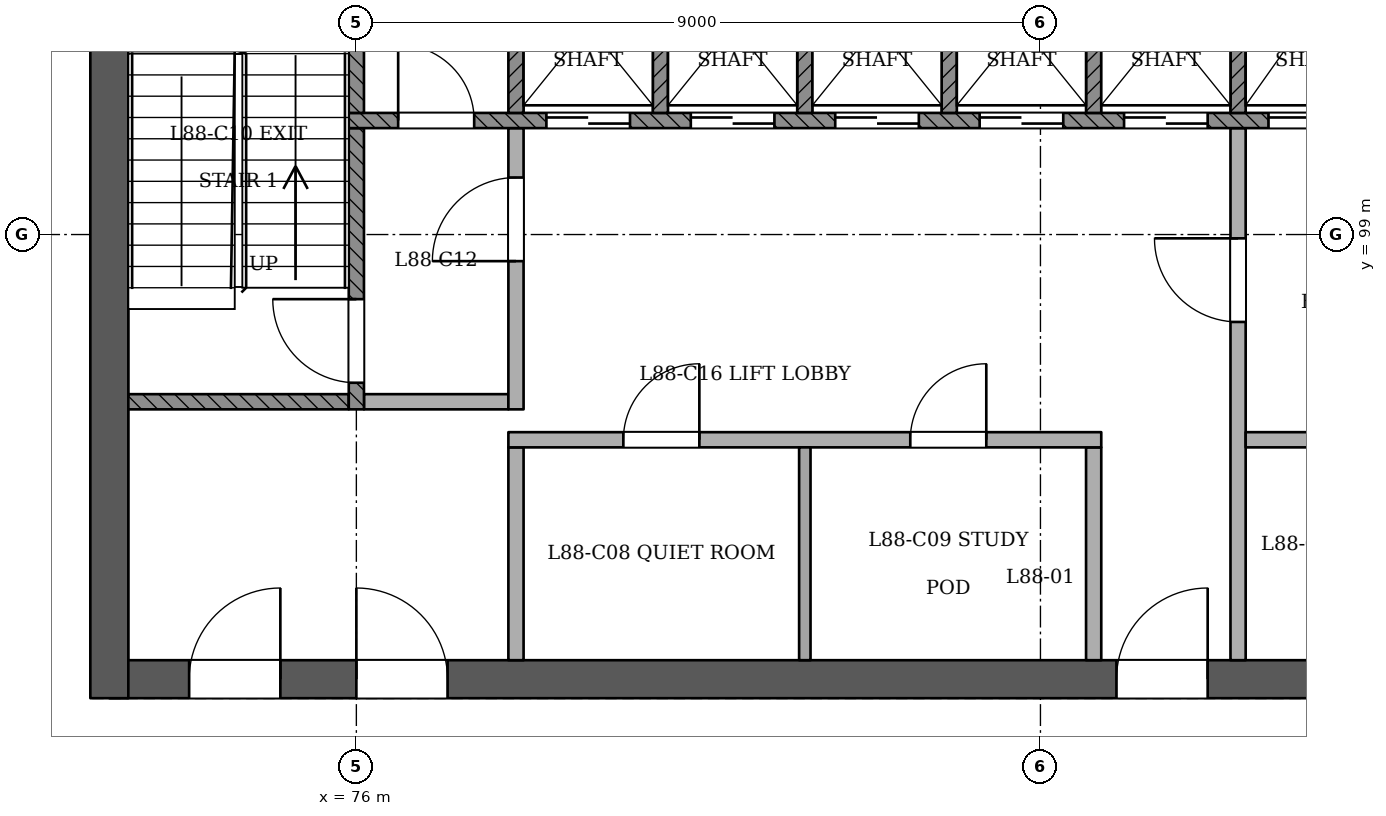
"""IFC4 building model, lengths in metres.
Left out: names, types, materials, properties, quantities, classifications, styles, units other than length and angle.
Written with IfcOpenShell. Run it as: python <this file> out.ifc"""

import sys

from ifc_helpers import new_model, si_unit, direction, frame, frame_2d, origin, place, context, subcontext, project, spatial, rectangle, extrude, element, fill, save


model = new_model("IFC4")
c1 = context("Model", 3, precision=1e-05, world=origin(), true_north=direction((0.0, 1.0)))
c2 = subcontext(c1, "Body", "Model", "MODEL_VIEW")
j1 = project(units=[si_unit("LENGTHUNIT", "METRE"), si_unit("PLANEANGLEUNIT", "RADIAN")], contexts=[c1])
p1 = place(None, origin())
s1 = spatial("IfcSite", under=j1, at=p1, CompositionType="ELEMENT")
p2 = place(p1, origin())
s2 = spatial("IfcBuilding", under=s1, at=p2, CompositionType="ELEMENT")
p3 = place(p2, frame((0.0, 0.0, 338.8)))
s3 = spatial("IfcBuildingStorey", under=s2, at=p3, CompositionType="ELEMENT", Elevation=338.8)
p4 = place(p3, frame((72.75, 93.15, 0.0), z_axis=(0.0, 0.0, 1.0), x_axis=(1.0, 0.0, 0.0)))
e1 = element("IfcWall", 1, at=p4, inside=s3, PredefinedType="SHEAR", context=c2, shape_type="SweptSolid", body=[
    extrude(rectangle(XDim=24.75, YDim=0.5, at=frame_2d((12.375, 0.0))), origin(), (0.0, 0.0, 1.0), 4.2),
])
p5 = place(p4, frame((1.05, 0.0, 0.0)))
e2 = element("IfcOpeningElement", 2, at=p5, cuts=e1, PredefinedType="OPENING", context=c2, shape_type="SweptSolid", body=[
    extrude(rectangle(XDim=1.2, YDim=2.1, at=frame_2d((0.6, 1.05))), frame((0.0, 0.26, 0.0), z_axis=(0.0, -1.0, 0.0), x_axis=(1.0, 0.0, 0.0)), (0.0, 0.0, 1.0), 0.521),
])
p6 = place(p4, frame((3.25, 0.0, 0.0)))
e3 = element("IfcOpeningElement", 3, at=p6, cuts=e1, PredefinedType="OPENING", context=c2, shape_type="SweptSolid", body=[
    extrude(rectangle(XDim=1.2, YDim=2.1, at=frame_2d((0.6, 1.05))), frame((0.0, 0.26, 0.0), z_axis=(0.0, -1.0, 0.0), x_axis=(1.0, 0.0, 0.0)), (0.0, 0.0, 1.0), 0.521),
])
p7 = place(p4, frame((13.25, 0.0, 0.0)))
e4 = element("IfcOpeningElement", 4, at=p7, cuts=e1, PredefinedType="OPENING", context=c2, shape_type="SweptSolid", body=[
    extrude(rectangle(XDim=1.2, YDim=2.1, at=frame_2d((0.6, 1.05))), frame((0.0, 0.26, 0.0), z_axis=(0.0, -1.0, 0.0), x_axis=(1.0, 0.0, 0.0)), (0.0, 0.0, 1.0), 0.521),
])
p8 = place(p4, frame((16.113, 0.0, 0.0)))
e5 = element("IfcOpeningElement", 5, at=p8, cuts=e1, PredefinedType="OPENING", context=c2, shape_type="SweptSolid", body=[
    extrude(rectangle(XDim=1.0, YDim=2.1, at=frame_2d((0.5, 1.05))), frame((0.0, 0.26, 0.0), z_axis=(0.0, -1.0, 0.0), x_axis=(1.0, 0.0, 0.0)), (0.0, 0.0, 1.0), 0.521),
])
p9 = place(p4, frame((19.55, 0.0, 0.0)))
e6 = element("IfcOpeningElement", 6, at=p9, cuts=e1, PredefinedType="OPENING", context=c2, shape_type="SweptSolid", body=[
    extrude(rectangle(XDim=1.0, YDim=2.1, at=frame_2d((0.5, 1.05))), frame((0.0, 0.26, 0.0), z_axis=(0.0, -1.0, 0.0), x_axis=(1.0, 0.0, 0.0)), (0.0, 0.0, 1.0), 0.521),
])
p10 = place(p4, frame((22.538, 0.0, 0.0)))
e7 = element("IfcOpeningElement", 7, at=p10, cuts=e1, PredefinedType="OPENING", context=c2, shape_type="SweptSolid", body=[
    extrude(rectangle(XDim=1.0, YDim=2.1, at=frame_2d((0.5, 1.05))), frame((0.0, 0.26, 0.0), z_axis=(0.0, -1.0, 0.0), x_axis=(1.0, 0.0, 0.0)), (0.0, 0.0, 1.0), 0.521),
])
p11 = place(p3, frame((72.75, 103.65, 0.0), z_axis=(0.0, 0.0, 1.0), x_axis=(0.0, -1.0, 0.0)))
e8 = element("IfcWall", 8, at=p11, inside=s3, PredefinedType="SHEAR", context=c2, shape_type="SweptSolid", body=[
    extrude(rectangle(XDim=10.75, YDim=0.5, at=frame_2d((5.375, 0.0))), origin(), (0.0, 0.0, 1.0), 4.2),
])
p12 = place(p3, frame((78.1, 93.4, 0.0), z_axis=(0.0, 0.0, 1.0), x_axis=(0.0, 1.0, 0.0)))
e9 = element("IfcWall", 9, at=p12, inside=s3, PredefinedType="PARTITIONING", context=c2, shape_type="SweptSolid", body=[
    extrude(rectangle(XDim=2.8, YDim=0.2, at=frame_2d((1.4, 0.0))), origin(), (0.0, 0.0, 1.0), 3.9),
])
p13 = place(p3, frame((81.9, 93.4, 0.0), z_axis=(0.0, 0.0, 1.0), x_axis=(0.0, 1.0, 0.0)))
e10 = element("IfcWall", 10, at=p13, inside=s3, PredefinedType="PARTITIONING", context=c2, shape_type="SweptSolid", body=[
    extrude(rectangle(XDim=2.8, YDim=0.15, at=frame_2d((1.4, 0.0))), origin(), (0.0, 0.0, 1.0), 3.9),
])
p14 = place(p3, frame((85.7, 93.4, 0.0), z_axis=(0.0, 0.0, 1.0), x_axis=(0.0, 1.0, 0.0)))
e11 = element("IfcWall", 11, at=p14, inside=s3, PredefinedType="PARTITIONING", context=c2, shape_type="SweptSolid", body=[
    extrude(rectangle(XDim=2.8, YDim=0.2, at=frame_2d((1.4, 0.0))), origin(), (0.0, 0.0, 1.0), 3.9),
])
p15 = place(p3, frame((87.6, 93.4, 0.0), z_axis=(0.0, 0.0, 1.0), x_axis=(0.0, 1.0, 0.0)))
e12 = element("IfcWall", 12, at=p15, inside=s3, PredefinedType="PARTITIONING", context=c2, shape_type="SweptSolid", body=[
    extrude(rectangle(XDim=7.0, YDim=0.2, at=frame_2d((3.5, 0.0))), origin(), (0.0, 0.0, 1.0), 3.9),
])
p16 = place(p15, frame((4.45, 0.0, 0.0)))
e13 = element("IfcOpeningElement", 13, at=p16, cuts=e12, PredefinedType="OPENING", context=c2, shape_type="SweptSolid", body=[
    extrude(rectangle(XDim=1.1, YDim=2.1, at=frame_2d((0.55, 1.05))), frame((0.0, 0.11, 0.0), z_axis=(0.0, -1.0, 0.0), x_axis=(1.0, 0.0, 0.0)), (0.0, 0.0, 1.0), 0.221),
])
p17 = place(p3, frame((78.0, 96.3, 0.0), z_axis=(0.0, 0.0, 1.0), x_axis=(1.0, 0.0, 0.0)))
e14 = element("IfcWall", 14, at=p17, inside=s3, PredefinedType="PARTITIONING", context=c2, shape_type="SweptSolid", body=[
    extrude(rectangle(XDim=7.8, YDim=0.2, at=frame_2d((3.9, 0.0))), origin(), (0.0, 0.0, 1.0), 3.9),
])
p18 = place(p17, frame((1.512, 0.0, 0.0)))
e15 = element("IfcOpeningElement", 15, at=p18, cuts=e14, PredefinedType="OPENING", context=c2, shape_type="SweptSolid", body=[
    extrude(rectangle(XDim=1.0, YDim=2.1, at=frame_2d((0.5, 1.05))), frame((0.0, 0.11, 0.0), z_axis=(0.0, -1.0, 0.0), x_axis=(1.0, 0.0, 0.0)), (0.0, 0.0, 1.0), 0.221),
])
p19 = place(p17, frame((5.288, 0.0, 0.0)))
e16 = element("IfcOpeningElement", 16, at=p19, cuts=e14, PredefinedType="OPENING", context=c2, shape_type="SweptSolid", body=[
    extrude(rectangle(XDim=1.0, YDim=2.1, at=frame_2d((0.5, 1.05))), frame((0.0, 0.11, 0.0), z_axis=(0.0, -1.0, 0.0), x_axis=(1.0, 0.0, 0.0)), (0.0, 0.0, 1.0), 0.221),
])
p20 = place(p3, frame((87.7, 96.3, 0.0), z_axis=(0.0, 0.0, 1.0), x_axis=(1.0, 0.0, 0.0)))
e17 = element("IfcWall", 17, at=p20, inside=s3, PredefinedType="PARTITIONING", context=c2, shape_type="SweptSolid", body=[
    extrude(rectangle(XDim=3.6, YDim=0.2, at=frame_2d((1.8, 0.0))), origin(), (0.0, 0.0, 1.0), 3.9),
])
p21 = place(p3, frame((73.0, 96.8, 0.0), z_axis=(0.0, 0.0, 1.0), x_axis=(1.0, 0.0, 0.0)))
e18 = element("IfcWall", 18, at=p21, inside=s3, PredefinedType="SOLIDWALL", context=c2, shape_type="SweptSolid", body=[
    extrude(rectangle(XDim=2.9, YDim=0.2, at=frame_2d((1.45, 0.0))), origin(), (0.0, 0.0, 1.0), 3.9),
])
p22 = place(p3, frame((76.0, 96.7, 0.0), z_axis=(0.0, 0.0, 1.0), x_axis=(0.0, 1.0, 0.0)))
e19 = element("IfcWall", 19, at=p22, inside=s3, PredefinedType="SOLIDWALL", context=c2, shape_type="SweptSolid", body=[
    extrude(rectangle(XDim=3.7, YDim=0.2, at=frame_2d((1.85, 0.0))), origin(), (0.0, 0.0, 1.0), 3.9),
])
p23 = place(p22, frame((0.35, 0.0, 0.0)))
e20 = element("IfcOpeningElement", 20, at=p23, cuts=e19, PredefinedType="OPENING", context=c2, shape_type="SweptSolid", body=[
    extrude(rectangle(XDim=1.1, YDim=2.1, at=frame_2d((0.55, 1.05))), frame((0.0, 0.11, 0.0), z_axis=(0.0, -1.0, 0.0), x_axis=(1.0, 0.0, 0.0)), (0.0, 0.0, 1.0), 0.221),
])
p24 = place(p3, frame((76.1, 96.8, 0.0), z_axis=(0.0, 0.0, 1.0), x_axis=(1.0, 0.0, 0.0)))
e21 = element("IfcWall", 21, at=p24, inside=s3, PredefinedType="PARTITIONING", context=c2, shape_type="SweptSolid", body=[
    extrude(rectangle(XDim=1.9, YDim=0.2, at=frame_2d((0.95, 0.0))), origin(), (0.0, 0.0, 1.0), 3.9),
])
p25 = place(p3, frame((78.1, 96.7, 0.0), z_axis=(0.0, 0.0, 1.0), x_axis=(0.0, 1.0, 0.0)))
e22 = element("IfcWall", 22, at=p25, inside=s3, PredefinedType="PARTITIONING", context=c2, shape_type="SweptSolid", body=[
    extrude(rectangle(XDim=3.7, YDim=0.2, at=frame_2d((1.85, 0.0))), origin(), (0.0, 0.0, 1.0), 3.9),
])
p26 = place(p25, frame((1.95, 0.0, 0.0)))
e23 = element("IfcOpeningElement", 23, at=p26, cuts=e22, PredefinedType="OPENING", context=c2, shape_type="SweptSolid", body=[
    extrude(rectangle(XDim=1.1, YDim=2.1, at=frame_2d((0.55, 1.05))), frame((0.0, 0.11, 0.0), z_axis=(0.0, -1.0, 0.0), x_axis=(1.0, 0.0, 0.0)), (0.0, 0.0, 1.0), 0.221),
])
p27 = place(p3, frame((75.9, 100.5, 0.0), z_axis=(0.0, 0.0, 1.0), x_axis=(1.0, 0.0, 0.0)))
e24 = element("IfcWall", 24, at=p27, inside=s3, PredefinedType="SOLIDWALL", context=c2, shape_type="SweptSolid", body=[
    extrude(rectangle(XDim=18.2, YDim=0.2, at=frame_2d((9.1, 0.0))), origin(), (0.0, 0.0, 1.0), 3.9),
])
p28 = place(p27, frame((2.6, 0.0, 0.0)))
e25 = element("IfcOpeningElement", 25, at=p28, cuts=e24, PredefinedType="OPENING", context=c2, shape_type="SweptSolid", body=[
    extrude(rectangle(XDim=1.1, YDim=2.1, at=frame_2d((0.55, 1.05))), frame((0.0, 0.11, 0.0), z_axis=(0.0, -1.0, 0.0), x_axis=(1.0, 0.0, 0.0)), (0.0, 0.0, 1.0), 0.221),
])
p29 = place(p27, frame((4.5, 0.0, 0.0)))
e26 = element("IfcOpeningElement", 26, at=p29, cuts=e24, PredefinedType="OPENING", context=c2, shape_type="SweptSolid", body=[
    extrude(rectangle(XDim=1.1, YDim=2.1, at=frame_2d((0.55, 1.05))), frame((0.0, 0.11, 0.0), z_axis=(0.0, -1.0, 0.0), x_axis=(1.0, 0.0, 0.0)), (0.0, 0.0, 1.0), 0.221),
])
p30 = place(p27, frame((6.4, 0.0, 0.0)))
e27 = element("IfcOpeningElement", 27, at=p30, cuts=e24, PredefinedType="OPENING", context=c2, shape_type="SweptSolid", body=[
    extrude(rectangle(XDim=1.1, YDim=2.1, at=frame_2d((0.55, 1.05))), frame((0.0, 0.11, 0.0), z_axis=(0.0, -1.0, 0.0), x_axis=(1.0, 0.0, 0.0)), (0.0, 0.0, 1.0), 0.221),
])
p31 = place(p27, frame((8.3, 0.0, 0.0)))
e28 = element("IfcOpeningElement", 28, at=p31, cuts=e24, PredefinedType="OPENING", context=c2, shape_type="SweptSolid", body=[
    extrude(rectangle(XDim=1.1, YDim=2.1, at=frame_2d((0.55, 1.05))), frame((0.0, 0.11, 0.0), z_axis=(0.0, -1.0, 0.0), x_axis=(1.0, 0.0, 0.0)), (0.0, 0.0, 1.0), 0.221),
])
p32 = place(p27, frame((10.2, 0.0, 0.0)))
e29 = element("IfcOpeningElement", 29, at=p32, cuts=e24, PredefinedType="OPENING", context=c2, shape_type="SweptSolid", body=[
    extrude(rectangle(XDim=1.1, YDim=2.1, at=frame_2d((0.55, 1.05))), frame((0.0, 0.11, 0.0), z_axis=(0.0, -1.0, 0.0), x_axis=(1.0, 0.0, 0.0)), (0.0, 0.0, 1.0), 0.221),
])
p33 = place(p27, frame((12.1, 0.0, 0.0)))
e30 = element("IfcOpeningElement", 30, at=p33, cuts=e24, PredefinedType="OPENING", context=c2, shape_type="SweptSolid", body=[
    extrude(rectangle(XDim=1.1, YDim=2.1, at=frame_2d((0.55, 1.05))), frame((0.0, 0.11, 0.0), z_axis=(0.0, -1.0, 0.0), x_axis=(1.0, 0.0, 0.0)), (0.0, 0.0, 1.0), 0.221),
])
p34 = place(p27, frame((14.0, 0.0, 0.0)))
e31 = element("IfcOpeningElement", 31, at=p34, cuts=e24, PredefinedType="OPENING", context=c2, shape_type="SweptSolid", body=[
    extrude(rectangle(XDim=1.1, YDim=2.1, at=frame_2d((0.55, 1.05))), frame((0.0, 0.11, 0.0), z_axis=(0.0, -1.0, 0.0), x_axis=(1.0, 0.0, 0.0)), (0.0, 0.0, 1.0), 0.221),
])
p35 = place(p27, frame((0.65, 0.0, 0.0)))
e32 = element("IfcOpeningElement", 32, at=p35, cuts=e24, PredefinedType="OPENING", context=c2, shape_type="SweptSolid", body=[
    extrude(rectangle(XDim=1.0, YDim=2.1, at=frame_2d((0.5, 1.05))), frame((0.0, 0.11, 0.0), z_axis=(0.0, -1.0, 0.0), x_axis=(1.0, 0.0, 0.0)), (0.0, 0.0, 1.0), 0.221),
])
p36 = place(p27, frame((16.3, 0.0, 0.0)))
e33 = element("IfcOpeningElement", 33, at=p36, cuts=e24, PredefinedType="OPENING", context=c2, shape_type="SweptSolid", body=[
    extrude(rectangle(XDim=1.0, YDim=2.1, at=frame_2d((0.5, 1.05))), frame((0.0, 0.11, 0.0), z_axis=(0.0, -1.0, 0.0), x_axis=(1.0, 0.0, 0.0)), (0.0, 0.0, 1.0), 0.221),
])
for number, where, z_axis, x_axis in (
    (34, (76.0, 100.6, 0.0), (0.0, 0.0, 1.0), (0.0, 1.0, 0.0)),
    (35, (78.1, 100.6, 0.0), (0.0, 0.0, 1.0), (0.0, 1.0, 0.0)),
    (36, (80.0, 100.6, 0.0), (0.0, 0.0, 1.0), (0.0, 1.0, 0.0)),
    (37, (81.9, 100.6, 0.0), (0.0, 0.0, 1.0), (0.0, 1.0, 0.0)),
    (38, (83.8, 100.6, 0.0), (0.0, 0.0, 1.0), (0.0, 1.0, 0.0)),
    (39, (85.7, 100.6, 0.0), (0.0, 0.0, 1.0), (0.0, 1.0, 0.0)),
    (40, (87.6, 100.6, 0.0), (0.0, 0.0, 1.0), (0.0, 1.0, 0.0)),
):
    element("IfcWall", number, at=place(p3, frame(where, z_axis=z_axis, x_axis=x_axis)), inside=s3, PredefinedType="SOLIDWALL", context=c2, shape_type="SweptSolid", body=[
        extrude(rectangle(XDim=2.8, YDim=0.2, at=frame_2d((1.4, 0.0))), origin(), (0.0, 0.0, 1.0), 3.9),
    ])
p37 = place(p28, origin())
e41 = element("IfcDoor", 41, at=p37, inside=s3, OperationType="SLIDING_TO_RIGHT", PredefinedType="NOTDEFINED", context=c2, shape_type="SweptSolid", body=[
    extrude(rectangle(XDim=1.1, YDim=2.1, at=frame_2d((0.55, 1.05))), frame((0.0, 0.025, 0.0), z_axis=(0.0, -1.0, 0.0), x_axis=(1.0, 0.0, 0.0)), (0.0, 0.0, 1.0), 0.05),
])
fill(e25, e41)
p38 = place(p29, origin())
e42 = element("IfcDoor", 42, at=p38, inside=s3, OperationType="SLIDING_TO_LEFT", PredefinedType="NOTDEFINED", context=c2, shape_type="SweptSolid", body=[
    extrude(rectangle(XDim=1.1, YDim=2.1, at=frame_2d((0.55, 1.05))), frame((0.0, 0.025, 0.0), z_axis=(0.0, -1.0, 0.0), x_axis=(1.0, 0.0, 0.0)), (0.0, 0.0, 1.0), 0.05),
])
fill(e26, e42)
p39 = place(p30, origin())
e43 = element("IfcDoor", 43, at=p39, inside=s3, OperationType="SLIDING_TO_RIGHT", PredefinedType="NOTDEFINED", context=c2, shape_type="SweptSolid", body=[
    extrude(rectangle(XDim=1.1, YDim=2.1, at=frame_2d((0.55, 1.05))), frame((0.0, 0.025, 0.0), z_axis=(0.0, -1.0, 0.0), x_axis=(1.0, 0.0, 0.0)), (0.0, 0.0, 1.0), 0.05),
])
fill(e27, e43)
p40 = place(p31, origin())
e44 = element("IfcDoor", 44, at=p40, inside=s3, OperationType="SLIDING_TO_LEFT", PredefinedType="NOTDEFINED", context=c2, shape_type="SweptSolid", body=[
    extrude(rectangle(XDim=1.1, YDim=2.1, at=frame_2d((0.55, 1.05))), frame((0.0, 0.025, 0.0), z_axis=(0.0, -1.0, 0.0), x_axis=(1.0, 0.0, 0.0)), (0.0, 0.0, 1.0), 0.05),
])
fill(e28, e44)
p41 = place(p32, origin())
e45 = element("IfcDoor", 45, at=p41, inside=s3, OperationType="SLIDING_TO_RIGHT", PredefinedType="NOTDEFINED", context=c2, shape_type="SweptSolid", body=[
    extrude(rectangle(XDim=1.1, YDim=2.1, at=frame_2d((0.55, 1.05))), frame((0.0, 0.025, 0.0), z_axis=(0.0, -1.0, 0.0), x_axis=(1.0, 0.0, 0.0)), (0.0, 0.0, 1.0), 0.05),
])
fill(e29, e45)
p42 = place(p33, origin())
e46 = element("IfcDoor", 46, at=p42, inside=s3, OperationType="SLIDING_TO_RIGHT", PredefinedType="NOTDEFINED", context=c2, shape_type="SweptSolid", body=[
    extrude(rectangle(XDim=1.1, YDim=2.1, at=frame_2d((0.55, 1.05))), frame((0.0, 0.025, 0.0), z_axis=(0.0, -1.0, 0.0), x_axis=(1.0, 0.0, 0.0)), (0.0, 0.0, 1.0), 0.05),
])
fill(e30, e46)
p43 = place(p23, origin())
e47 = element("IfcDoor", 47, at=p43, inside=s3, OperationType="SINGLE_SWING_RIGHT", PredefinedType="NOTDEFINED", context=c2, shape_type="SweptSolid", body=[
    extrude(rectangle(XDim=1.1, YDim=2.1, at=frame_2d((0.55, 1.05))), frame((0.0, 0.025, 0.0), z_axis=(0.0, -1.0, 0.0), x_axis=(1.0, 0.0, 0.0)), (0.0, 0.0, 1.0), 0.05),
])
fill(e20, e47)
p44 = place(p26, origin())
e48 = element("IfcDoor", 48, at=p44, inside=s3, OperationType="SINGLE_SWING_LEFT", PredefinedType="NOTDEFINED", context=c2, shape_type="SweptSolid", body=[
    extrude(rectangle(XDim=1.1, YDim=2.1, at=frame_2d((0.55, 1.05))), frame((0.0, 0.025, 0.0), z_axis=(0.0, -1.0, 0.0), x_axis=(1.0, 0.0, 0.0)), (0.0, 0.0, 1.0), 0.05),
])
fill(e23, e48)
p45 = place(p16, origin())
e49 = element("IfcDoor", 49, at=p45, inside=s3, OperationType="SINGLE_SWING_RIGHT", PredefinedType="NOTDEFINED", context=c2, shape_type="SweptSolid", body=[
    extrude(rectangle(XDim=1.1, YDim=2.1, at=frame_2d((0.55, 1.05))), frame((0.0, 0.025, 0.0), z_axis=(0.0, -1.0, 0.0), x_axis=(1.0, 0.0, 0.0)), (0.0, 0.0, 1.0), 0.05),
])
fill(e13, e49)
p46 = place(p5, origin())
e50 = element("IfcDoor", 50, at=p46, inside=s3, OperationType="SINGLE_SWING_RIGHT", PredefinedType="NOTDEFINED", context=c2, shape_type="SweptSolid", body=[
    extrude(rectangle(XDim=1.2, YDim=2.1, at=frame_2d((0.6, 1.05))), frame((0.0, 0.025, 0.0), z_axis=(0.0, -1.0, 0.0), x_axis=(1.0, 0.0, 0.0)), (0.0, 0.0, 1.0), 0.05),
])
fill(e2, e50)
p47 = place(p6, origin())
e51 = element("IfcDoor", 51, at=p47, inside=s3, OperationType="SINGLE_SWING_LEFT", PredefinedType="NOTDEFINED", context=c2, shape_type="SweptSolid", body=[
    extrude(rectangle(XDim=1.2, YDim=2.1, at=frame_2d((0.6, 1.05))), frame((0.0, 0.025, 0.0), z_axis=(0.0, -1.0, 0.0), x_axis=(1.0, 0.0, 0.0)), (0.0, 0.0, 1.0), 0.05),
])
fill(e3, e51)
p48 = place(p7, origin())
e52 = element("IfcDoor", 52, at=p48, inside=s3, OperationType="SINGLE_SWING_RIGHT", PredefinedType="NOTDEFINED", context=c2, shape_type="SweptSolid", body=[
    extrude(rectangle(XDim=1.2, YDim=2.1, at=frame_2d((0.6, 1.05))), frame((0.0, 0.025, 0.0), z_axis=(0.0, -1.0, 0.0), x_axis=(1.0, 0.0, 0.0)), (0.0, 0.0, 1.0), 0.05),
])
fill(e4, e52)
p49 = place(p35, origin())
e53 = element("IfcDoor", 53, at=p49, inside=s3, OperationType="SINGLE_SWING_LEFT", PredefinedType="NOTDEFINED", context=c2, shape_type="SweptSolid", body=[
    extrude(rectangle(XDim=1.0, YDim=2.1, at=frame_2d((0.5, 1.05))), frame((0.0, 0.025, 0.0), z_axis=(0.0, -1.0, 0.0), x_axis=(1.0, 0.0, 0.0)), (0.0, 0.0, 1.0), 0.05),
])
fill(e32, e53)
p50 = place(p18, origin())
e54 = element("IfcDoor", 54, at=p50, inside=s3, OperationType="SINGLE_SWING_RIGHT", PredefinedType="NOTDEFINED", context=c2, shape_type="SweptSolid", body=[
    extrude(rectangle(XDim=1.0, YDim=2.1, at=frame_2d((0.5, 1.05))), frame((0.0, 0.025, 0.0), z_axis=(0.0, -1.0, 0.0), x_axis=(1.0, 0.0, 0.0)), (0.0, 0.0, 1.0), 0.05),
])
fill(e15, e54)
p51 = place(p19, origin())
e55 = element("IfcDoor", 55, at=p51, inside=s3, OperationType="SINGLE_SWING_RIGHT", PredefinedType="NOTDEFINED", context=c2, shape_type="SweptSolid", body=[
    extrude(rectangle(XDim=1.0, YDim=2.1, at=frame_2d((0.5, 1.05))), frame((0.0, 0.025, 0.0), z_axis=(0.0, -1.0, 0.0), x_axis=(1.0, 0.0, 0.0)), (0.0, 0.0, 1.0), 0.05),
])
fill(e16, e55)
save(model, sys.argv[1])
